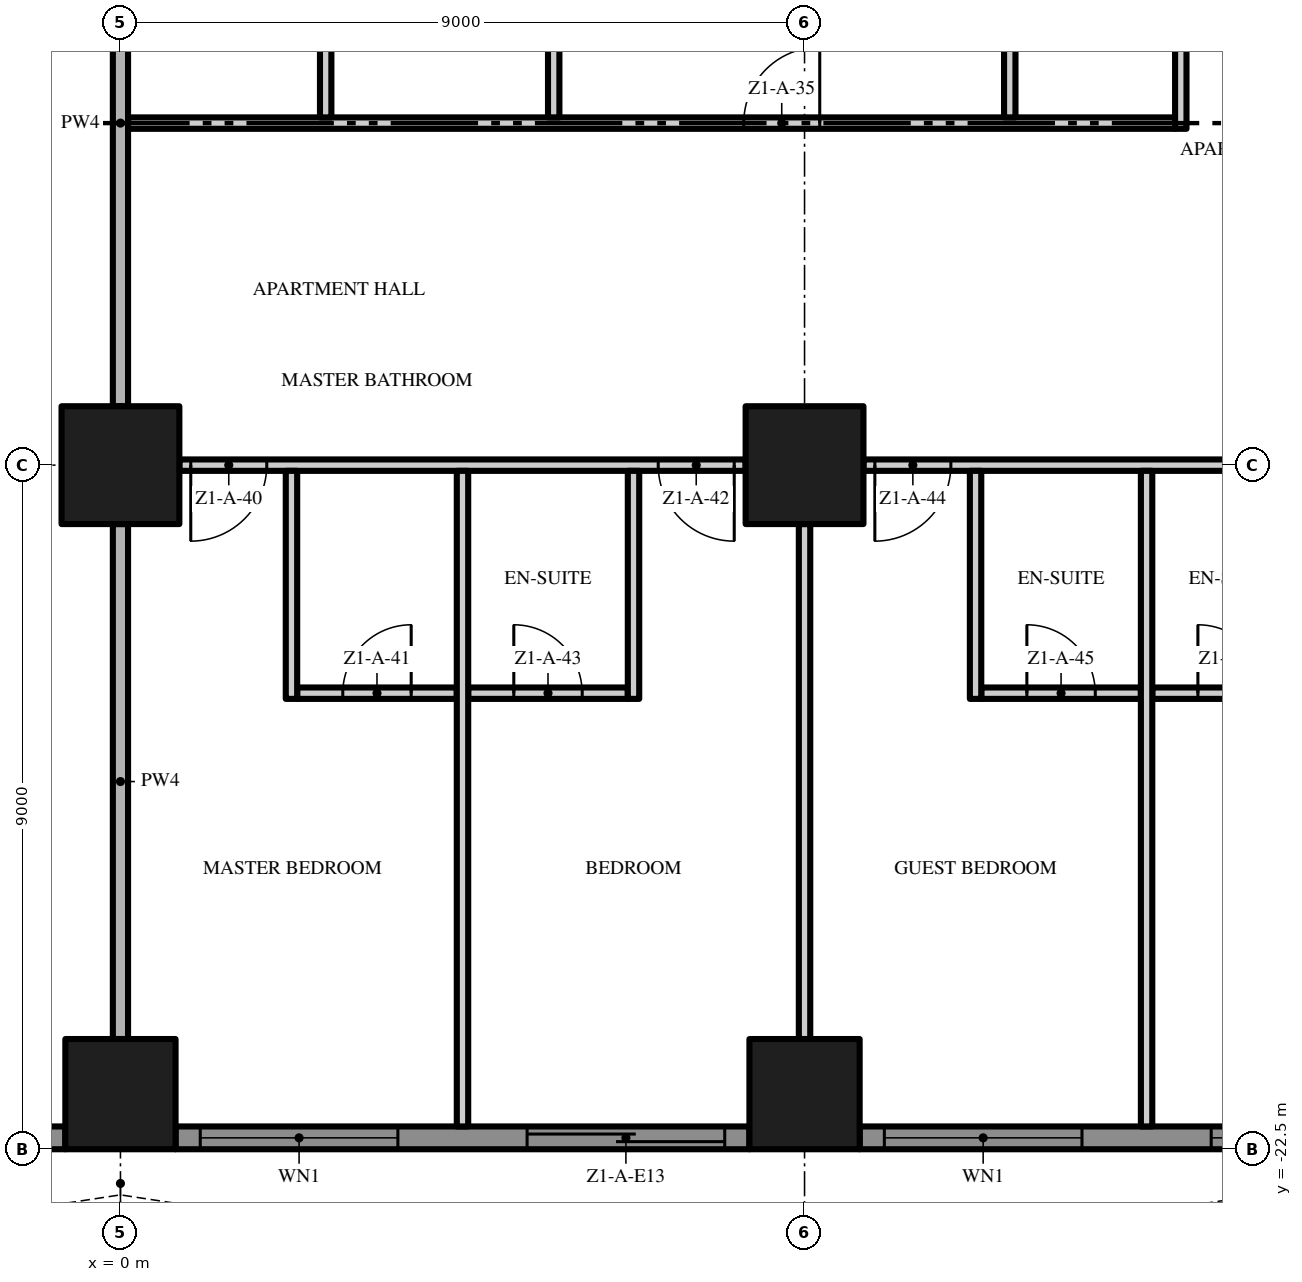
"""IFC4 building model, lengths in metres.
Left out: names, types, materials, properties, quantities, classifications, styles, units other than length and angle.
Written with IfcOpenShell. Run it as: python <this file> out.ifc"""

import sys

from ifc_helpers import new_model, si_unit, direction, frame, frame_2d, origin, origin_2d, place, context, subcontext, project, spatial, polyline, rectangle, outline, extrude, element, fill, save


model = new_model("IFC4")
c1 = context("Model", 3, precision=1e-05, world=origin(), true_north=direction((0.0, 1.0)))
c2 = subcontext(c1, "Body", "Model", "MODEL_VIEW")
j1 = project(units=[si_unit("LENGTHUNIT", "METRE"), si_unit("PLANEANGLEUNIT", "RADIAN")], contexts=[c1])
p1 = place(None, origin())
s1 = spatial("IfcSite", under=j1, at=p1, CompositionType="ELEMENT")
p2 = place(p1, origin())
s2 = spatial("IfcBuilding", under=s1, at=p2, CompositionType="ELEMENT")
p3 = place(p2, frame((0.0, 0.0, 22.6)))
s3 = spatial("IfcBuildingStorey", under=s2, at=p3, CompositionType="ELEMENT", Elevation=22.6)
p4 = place(p3, frame((0.0, -13.5, 0.0), z_axis=(0.0, 0.0, 1.0), x_axis=(1.0, 0.0, 0.0)))
e1 = element("IfcColumn", 1, at=p4, inside=s3, PredefinedType="COLUMN", context=c2, shape_type="SweptSolid", body=[
    extrude(rectangle(XDim=1.55, YDim=1.55, at=origin_2d()), origin(), (0.0, 0.0, 1.0), 3.5),
])
p5 = place(p3, frame((0.0, -21.775, 0.0), z_axis=(0.0, 0.0, 1.0), x_axis=(1.0, 0.0, 0.0)))
e2 = element("IfcColumn", 2, at=p5, inside=s3, PredefinedType="COLUMN", context=c2, shape_type="SweptSolid", body=[
    extrude(rectangle(XDim=1.45, YDim=1.45, at=origin_2d()), origin(), (0.0, 0.0, 1.0), 3.5),
])
p6 = place(p3, frame((9.0, -13.5, 0.0), z_axis=(0.0, 0.0, 1.0), x_axis=(1.0, 0.0, 0.0)))
e3 = element("IfcColumn", 3, at=p6, inside=s3, PredefinedType="COLUMN", context=c2, shape_type="SweptSolid", body=[
    extrude(rectangle(XDim=1.55, YDim=1.55, at=origin_2d()), origin(), (0.0, 0.0, 1.0), 3.5),
])
p7 = place(p3, frame((9.0, -21.775, 0.0), z_axis=(0.0, 0.0, 1.0), x_axis=(1.0, 0.0, 0.0)))
e4 = element("IfcColumn", 4, at=p7, inside=s3, PredefinedType="COLUMN", context=c2, shape_type="SweptSolid", body=[
    extrude(rectangle(XDim=1.45, YDim=1.45, at=origin_2d()), origin(), (0.0, 0.0, 1.0), 3.5),
])
p8 = place(p3, frame((-0.725, -22.35, 0.0), z_axis=(0.0, 0.0, 1.0), x_axis=(-1.0, 0.0, 0.0)))
e5 = element("IfcWall", 5, at=p8, inside=s3, PredefinedType="SOLIDWALL", context=c2, shape_type="SweptSolid", body=[
    extrude(rectangle(XDim=7.55, YDim=0.3, at=frame_2d((3.775, 0.0))), origin(), (0.0, 0.0, 1.0), 3.5),
])
p9 = place(p8, frame((4.625, 0.0, 0.0)))
e6 = element("IfcOpeningElement", 6, at=p9, cuts=e5, PredefinedType="OPENING", context=c2, shape_type="SweptSolid", body=[
    extrude(rectangle(XDim=2.6, YDim=2.4, at=frame_2d((1.3, 1.2))), frame((0.0, 0.16, 0.0), z_axis=(0.0, -1.0, 0.0), x_axis=(1.0, 0.0, 0.0)), (0.0, 0.0, 1.0), 0.32),
])
p10 = place(p8, frame((0.325, 0.0, 0.45)))
e7 = element("IfcOpeningElement", 7, at=p10, cuts=e5, PredefinedType="OPENING", context=c2, shape_type="SweptSolid", body=[
    extrude(rectangle(XDim=2.6, YDim=2.65, at=frame_2d((1.3, 1.325))), frame((0.0, 0.16, 0.0), z_axis=(0.0, -1.0, 0.0), x_axis=(1.0, 0.0, 0.0)), (0.0, 0.0, 1.0), 0.32),
])
p11 = place(p3, frame((8.275, -22.35, 0.0), z_axis=(0.0, 0.0, 1.0), x_axis=(-1.0, 0.0, 0.0)))
e8 = element("IfcWall", 8, at=p11, inside=s3, PredefinedType="SOLIDWALL", context=c2, shape_type="SweptSolid", body=[
    extrude(rectangle(XDim=7.55, YDim=0.3, at=frame_2d((3.775, 0.0))), origin(), (0.0, 0.0, 1.0), 3.5),
])
p12 = place(p11, frame((4.625, 0.0, 0.45)))
e9 = element("IfcOpeningElement", 9, at=p12, cuts=e8, PredefinedType="OPENING", context=c2, shape_type="SweptSolid", body=[
    extrude(rectangle(XDim=2.6, YDim=2.65, at=frame_2d((1.3, 1.325))), frame((0.0, 0.16, 0.0), z_axis=(0.0, -1.0, 0.0), x_axis=(1.0, 0.0, 0.0)), (0.0, 0.0, 1.0), 0.32),
])
p13 = place(p11, frame((0.325, 0.0, 0.0)))
e10 = element("IfcOpeningElement", 10, at=p13, cuts=e8, PredefinedType="OPENING", context=c2, shape_type="SweptSolid", body=[
    extrude(rectangle(XDim=2.6, YDim=2.4, at=frame_2d((1.3, 1.2))), frame((0.0, 0.16, 0.0), z_axis=(0.0, -1.0, 0.0), x_axis=(1.0, 0.0, 0.0)), (0.0, 0.0, 1.0), 0.32),
])
p14 = place(p3, frame((17.275, -22.35, 0.0), z_axis=(0.0, 0.0, 1.0), x_axis=(-1.0, 0.0, 0.0)))
e11 = element("IfcWall", 11, at=p14, inside=s3, PredefinedType="SOLIDWALL", context=c2, shape_type="SweptSolid", body=[
    extrude(rectangle(XDim=7.55, YDim=0.3, at=frame_2d((3.775, 0.0))), origin(), (0.0, 0.0, 1.0), 3.5),
])
p15 = place(p14, frame((4.625, 0.0, 0.45)))
e12 = element("IfcOpeningElement", 12, at=p15, cuts=e11, PredefinedType="OPENING", context=c2, shape_type="SweptSolid", body=[
    extrude(rectangle(XDim=2.6, YDim=2.65, at=frame_2d((1.3, 1.325))), frame((0.0, 0.16, 0.0), z_axis=(0.0, -1.0, 0.0), x_axis=(1.0, 0.0, 0.0)), (0.0, 0.0, 1.0), 0.32),
])
p16 = place(p14, frame((0.325, 0.0, 0.45)))
e13 = element("IfcOpeningElement", 13, at=p16, cuts=e11, PredefinedType="OPENING", context=c2, shape_type="SweptSolid", body=[
    extrude(rectangle(XDim=2.6, YDim=2.65, at=frame_2d((1.3, 1.325))), frame((0.0, 0.16, 0.0), z_axis=(0.0, -1.0, 0.0), x_axis=(1.0, 0.0, 0.0)), (0.0, 0.0, 1.0), 0.32),
])
p17 = place(p3, origin())
e14 = element("IfcWall", 14, at=p17, inside=s3, PredefinedType="USERDEFINED", context=c2, shape_type="SweptSolid", body=[
    extrude(outline(polyline([(-22.5, -25.5), (-21.0, -25.271), (-19.5, -24.671), (-18.0, -23.929), (-16.5, -23.329), (-15.0, -23.1), (-13.5, -23.329), (-12.0, -23.929), (-10.5, -24.671), (-9.0, -25.271), (-7.5, -25.5), (-6.0, -25.271), (-4.5, -24.671), (-3.0, -23.929), (-1.5, -23.329), (0.0, -23.1), (1.5, -23.329), (3.0, -23.929), (4.5, -24.671), (6.0, -25.271), (7.5, -25.5), (9.0, -25.271), (10.5, -24.671), (12.0, -23.929), (13.5, -23.329), (15.0, -23.1), (16.5, -23.329), (18.0, -23.929), (19.5, -24.671), (21.0, -25.271), (22.5, -25.5), (22.538, -25.253), (21.066, -25.028), (19.602, -24.442), (18.102, -23.701), (16.566, -23.086), (15.0, -22.847), (13.434, -23.086), (11.898, -23.701), (10.398, -24.442), (8.934, -25.028), (7.5, -25.247), (6.066, -25.028), (4.602, -24.442), (3.102, -23.701), (1.566, -23.086), (0.0, -22.847), (-1.566, -23.086), (-3.102, -23.701), (-4.602, -24.442), (-6.066, -25.028), (-7.5, -25.247), (-8.934, -25.028), (-10.398, -24.442), (-11.898, -23.701), (-13.434, -23.086), (-15.0, -22.847), (-16.566, -23.086), (-18.102, -23.701), (-19.602, -24.442), (-21.066, -25.028), (-22.538, -25.253), (-22.5, -25.5)])), origin(), (0.0, 0.0, 1.0), 0.9),
])
p18 = place(p3, frame((2.325, -16.5, 0.0), z_axis=(0.0, 0.0, 1.0), x_axis=(1.0, 0.0, 0.0)))
e15 = element("IfcWall", 15, at=p18, inside=s3, PredefinedType="PARTITIONING", context=c2, shape_type="SweptSolid", body=[
    extrude(rectangle(XDim=2.1, YDim=0.15, at=frame_2d((1.05, 0.0))), origin(), (0.0, 0.0, 1.0), 3.5),
])
p19 = place(p18, frame((0.6, 0.0, 0.0)))
e16 = element("IfcOpeningElement", 16, at=p19, cuts=e15, PredefinedType="OPENING", context=c2, shape_type="SweptSolid", body=[
    extrude(rectangle(XDim=0.9, YDim=2.1, at=frame_2d((0.45, 1.05))), frame((0.0, 0.085, 0.0), z_axis=(0.0, -1.0, 0.0), x_axis=(1.0, 0.0, 0.0)), (0.0, 0.0, 1.0), 0.17),
])
p20 = place(p3, frame((4.575, -16.5, 0.0), z_axis=(0.0, 0.0, 1.0), x_axis=(1.0, 0.0, 0.0)))
e17 = element("IfcWall", 17, at=p20, inside=s3, PredefinedType="PARTITIONING", context=c2, shape_type="SweptSolid", body=[
    extrude(rectangle(XDim=2.1, YDim=0.15, at=frame_2d((1.05, 0.0))), origin(), (0.0, 0.0, 1.0), 3.5),
])
p21 = place(p20, frame((0.6, 0.0, 0.0)))
e18 = element("IfcOpeningElement", 18, at=p21, cuts=e17, PredefinedType="OPENING", context=c2, shape_type="SweptSolid", body=[
    extrude(rectangle(XDim=0.9, YDim=2.1, at=frame_2d((0.45, 1.05))), frame((0.0, 0.085, 0.0), z_axis=(0.0, -1.0, 0.0), x_axis=(1.0, 0.0, 0.0)), (0.0, 0.0, 1.0), 0.17),
])
p22 = place(p3, frame((11.325, -16.5, 0.0), z_axis=(0.0, 0.0, 1.0), x_axis=(1.0, 0.0, 0.0)))
e19 = element("IfcWall", 19, at=p22, inside=s3, PredefinedType="PARTITIONING", context=c2, shape_type="SweptSolid", body=[
    extrude(rectangle(XDim=2.1, YDim=0.15, at=frame_2d((1.05, 0.0))), origin(), (0.0, 0.0, 1.0), 3.5),
])
p23 = place(p22, frame((0.6, 0.0, 0.0)))
e20 = element("IfcOpeningElement", 20, at=p23, cuts=e19, PredefinedType="OPENING", context=c2, shape_type="SweptSolid", body=[
    extrude(rectangle(XDim=0.9, YDim=2.1, at=frame_2d((0.45, 1.05))), frame((0.0, 0.085, 0.0), z_axis=(0.0, -1.0, 0.0), x_axis=(1.0, 0.0, 0.0)), (0.0, 0.0, 1.0), 0.17),
])
p24 = place(p3, frame((13.575, -16.5, 0.0), z_axis=(0.0, 0.0, 1.0), x_axis=(1.0, 0.0, 0.0)))
e21 = element("IfcWall", 21, at=p24, inside=s3, PredefinedType="PARTITIONING", context=c2, shape_type="SweptSolid", body=[
    extrude(rectangle(XDim=2.1, YDim=0.15, at=frame_2d((1.05, 0.0))), origin(), (0.0, 0.0, 1.0), 3.5),
])
p25 = place(p24, frame((0.6, 0.0, 0.0)))
e22 = element("IfcOpeningElement", 22, at=p25, cuts=e21, PredefinedType="OPENING", context=c2, shape_type="SweptSolid", body=[
    extrude(rectangle(XDim=0.9, YDim=2.1, at=frame_2d((0.45, 1.05))), frame((0.0, 0.085, 0.0), z_axis=(0.0, -1.0, 0.0), x_axis=(1.0, 0.0, 0.0)), (0.0, 0.0, 1.0), 0.17),
])
p26 = place(p3, frame((8.225, -13.5, 0.0), z_axis=(0.0, 0.0, 1.0), x_axis=(-1.0, 0.0, 0.0)))
e23 = element("IfcWall", 23, at=p26, inside=s3, PredefinedType="PARTITIONING", context=c2, shape_type="SweptSolid", body=[
    extrude(rectangle(XDim=7.45, YDim=0.15, at=frame_2d((3.725, 0.0))), origin(), (0.0, 0.0, 1.0), 3.5),
])
p27 = place(p26, frame((6.3, 0.0, 0.0)))
e24 = element("IfcOpeningElement", 24, at=p27, cuts=e23, PredefinedType="OPENING", context=c2, shape_type="SweptSolid", body=[
    extrude(rectangle(XDim=1.0, YDim=2.4, at=frame_2d((0.5, 1.2))), frame((0.0, 0.085, 0.0), z_axis=(0.0, -1.0, 0.0), x_axis=(1.0, 0.0, 0.0)), (0.0, 0.0, 1.0), 0.17),
])
p28 = place(p26, frame((0.15, 0.0, 0.0)))
e25 = element("IfcOpeningElement", 25, at=p28, cuts=e23, PredefinedType="OPENING", context=c2, shape_type="SweptSolid", body=[
    extrude(rectangle(XDim=1.0, YDim=2.4, at=frame_2d((0.5, 1.2))), frame((0.0, 0.085, 0.0), z_axis=(0.0, -1.0, 0.0), x_axis=(1.0, 0.0, 0.0)), (0.0, 0.0, 1.0), 0.17),
])
p29 = place(p3, frame((17.225, -13.5, 0.0), z_axis=(0.0, 0.0, 1.0), x_axis=(-1.0, 0.0, 0.0)))
e26 = element("IfcWall", 26, at=p29, inside=s3, PredefinedType="PARTITIONING", context=c2, shape_type="SweptSolid", body=[
    extrude(rectangle(XDim=7.45, YDim=0.15, at=frame_2d((3.725, 0.0))), origin(), (0.0, 0.0, 1.0), 3.5),
])
p30 = place(p29, frame((6.3, 0.0, 0.0)))
e27 = element("IfcOpeningElement", 27, at=p30, cuts=e26, PredefinedType="OPENING", context=c2, shape_type="SweptSolid", body=[
    extrude(rectangle(XDim=1.0, YDim=2.4, at=frame_2d((0.5, 1.2))), frame((0.0, 0.085, 0.0), z_axis=(0.0, -1.0, 0.0), x_axis=(1.0, 0.0, 0.0)), (0.0, 0.0, 1.0), 0.17),
])
p31 = place(p29, frame((0.15, 0.0, 0.0)))
e28 = element("IfcOpeningElement", 28, at=p31, cuts=e26, PredefinedType="OPENING", context=c2, shape_type="SweptSolid", body=[
    extrude(rectangle(XDim=1.0, YDim=2.4, at=frame_2d((0.5, 1.2))), frame((0.0, 0.085, 0.0), z_axis=(0.0, -1.0, 0.0), x_axis=(1.0, 0.0, 0.0)), (0.0, 0.0, 1.0), 0.17),
])
p32 = place(p3, frame((0.1, -9.0, 0.0), z_axis=(0.0, 0.0, 1.0), x_axis=(1.0, 0.0, 0.0)))
e29 = element("IfcWall", 29, at=p32, inside=s3, PredefinedType="PARTITIONING", context=c2, shape_type="SweptSolid", body=[
    extrude(rectangle(XDim=13.775, YDim=0.15, at=frame_2d((6.888, 0.0))), origin(), (0.0, 0.0, 1.0), 3.5),
])
p33 = place(p32, frame((8.1, 0.0, 0.0)))
e30 = element("IfcOpeningElement", 30, at=p33, cuts=e29, PredefinedType="OPENING", context=c2, shape_type="SweptSolid", body=[
    extrude(rectangle(XDim=1.0, YDim=2.4, at=frame_2d((0.5, 1.2))), frame((0.0, 0.085, 0.0), z_axis=(0.0, -1.0, 0.0), x_axis=(1.0, 0.0, 0.0)), (0.0, 0.0, 1.0), 0.17),
])
p34 = place(p3, frame((0.0, -21.05, 0.0), z_axis=(0.0, 0.0, 1.0), x_axis=(0.0, 1.0, 0.0)))
e31 = element("IfcWall", 31, at=p34, inside=s3, PredefinedType="PARTITIONING", context=c2, shape_type="SweptSolid", body=[
    extrude(rectangle(XDim=6.775, YDim=0.2, at=frame_2d((3.388, 0.0))), origin(), (0.0, 0.0, 1.0), 3.5),
])
p35 = place(p3, frame((0.0, -12.725, 0.0), z_axis=(0.0, 0.0, 1.0), x_axis=(0.0, 1.0, 0.0)))
e32 = element("IfcWall", 32, at=p35, inside=s3, PredefinedType="PARTITIONING", context=c2, shape_type="SweptSolid", body=[
    extrude(rectangle(XDim=7.45, YDim=0.2, at=frame_2d((3.725, 0.0))), origin(), (0.0, 0.0, 1.0), 3.5),
])
p36 = place(p3, frame((2.25, -16.575, 0.0), z_axis=(0.0, 0.0, 1.0), x_axis=(0.0, 1.0, 0.0)))
e33 = element("IfcWall", 33, at=p36, inside=s3, PredefinedType="PARTITIONING", context=c2, shape_type="SweptSolid", body=[
    extrude(rectangle(XDim=3.0, YDim=0.15, at=frame_2d((1.5, 0.0))), origin(), (0.0, 0.0, 1.0), 3.5),
])
p37 = place(p3, frame((2.7, -8.925, 0.0), z_axis=(0.0, 0.0, 1.0), x_axis=(0.0, 1.0, 0.0)))
e34 = element("IfcWall", 34, at=p37, inside=s3, PredefinedType="PARTITIONING", context=c2, shape_type="SweptSolid", body=[
    extrude(rectangle(XDim=4.35, YDim=0.15, at=frame_2d((2.175, 0.0))), origin(), (0.0, 0.0, 1.0), 3.5),
])
p38 = place(p3, frame((4.5, -22.2, 0.0), z_axis=(0.0, 0.0, 1.0), x_axis=(0.0, 1.0, 0.0)))
e35 = element("IfcWall", 35, at=p38, inside=s3, PredefinedType="PARTITIONING", context=c2, shape_type="SweptSolid", body=[
    extrude(rectangle(XDim=8.625, YDim=0.15, at=frame_2d((4.312, 0.0))), origin(), (0.0, 0.0, 1.0), 3.5),
])
p39 = place(p3, frame((5.7, -8.925, 0.0), z_axis=(0.0, 0.0, 1.0), x_axis=(0.0, 1.0, 0.0)))
e36 = element("IfcWall", 36, at=p39, inside=s3, PredefinedType="PARTITIONING", context=c2, shape_type="SweptSolid", body=[
    extrude(rectangle(XDim=4.35, YDim=0.15, at=frame_2d((2.175, 0.0))), origin(), (0.0, 0.0, 1.0), 3.5),
])
p40 = place(p3, frame((6.75, -16.575, 0.0), z_axis=(0.0, 0.0, 1.0), x_axis=(0.0, 1.0, 0.0)))
e37 = element("IfcWall", 37, at=p40, inside=s3, PredefinedType="PARTITIONING", context=c2, shape_type="SweptSolid", body=[
    extrude(rectangle(XDim=3.0, YDim=0.15, at=frame_2d((1.5, 0.0))), origin(), (0.0, 0.0, 1.0), 3.5),
])
p41 = place(p3, frame((9.0, -21.05, 0.0), z_axis=(0.0, 0.0, 1.0), x_axis=(0.0, 1.0, 0.0)))
e38 = element("IfcWall", 38, at=p41, inside=s3, PredefinedType="PARTITIONING", context=c2, shape_type="SweptSolid", body=[
    extrude(rectangle(XDim=6.775, YDim=0.15, at=frame_2d((3.388, 0.0))), origin(), (0.0, 0.0, 1.0), 3.5),
])
p42 = place(p3, frame((11.25, -16.575, 0.0), z_axis=(0.0, 0.0, 1.0), x_axis=(0.0, 1.0, 0.0)))
e39 = element("IfcWall", 39, at=p42, inside=s3, PredefinedType="PARTITIONING", context=c2, shape_type="SweptSolid", body=[
    extrude(rectangle(XDim=3.0, YDim=0.15, at=frame_2d((1.5, 0.0))), origin(), (0.0, 0.0, 1.0), 3.5),
])
p43 = place(p3, frame((11.7, -8.925, 0.0), z_axis=(0.0, 0.0, 1.0), x_axis=(0.0, 1.0, 0.0)))
e40 = element("IfcWall", 40, at=p43, inside=s3, PredefinedType="PARTITIONING", context=c2, shape_type="SweptSolid", body=[
    extrude(rectangle(XDim=4.35, YDim=0.15, at=frame_2d((2.175, 0.0))), origin(), (0.0, 0.0, 1.0), 3.5),
])
p44 = place(p3, frame((13.5, -22.2, 0.0), z_axis=(0.0, 0.0, 1.0), x_axis=(0.0, 1.0, 0.0)))
e41 = element("IfcWall", 41, at=p44, inside=s3, PredefinedType="PARTITIONING", context=c2, shape_type="SweptSolid", body=[
    extrude(rectangle(XDim=8.625, YDim=0.15, at=frame_2d((4.312, 0.0))), origin(), (0.0, 0.0, 1.0), 3.5),
])
p45 = place(p3, frame((13.95, -9.075, 0.0), z_axis=(0.0, 0.0, 1.0), x_axis=(0.0, 1.0, 0.0)))
e42 = element("IfcWall", 42, at=p45, inside=s3, PredefinedType="PARTITIONING", context=c2, shape_type="SweptSolid", body=[
    extrude(rectangle(XDim=4.65, YDim=0.15, at=frame_2d((2.325, 0.0))), origin(), (0.0, 0.0, 1.0), 3.5),
])
p46 = place(p45, frame((1.875, 0.0, 0.0)))
e43 = element("IfcOpeningElement", 43, at=p46, cuts=e42, PredefinedType="OPENING", context=c2, shape_type="SweptSolid", body=[
    extrude(rectangle(XDim=0.9, YDim=2.1, at=frame_2d((0.45, 1.05))), frame((0.0, 0.085, 0.0), z_axis=(0.0, -1.0, 0.0), x_axis=(1.0, 0.0, 0.0)), (0.0, 0.0, 1.0), 0.17),
])
p47 = place(p12, origin())
e44 = element("IfcWindow", 44, at=p47, inside=s3, PartitioningType="SINGLE_PANEL", PredefinedType="WINDOW", context=c2, shape_type="SweptSolid", body=[
    extrude(rectangle(XDim=2.6, YDim=2.65, at=frame_2d((1.3, 1.325))), frame((0.0, 0.03, 0.0), z_axis=(0.0, -1.0, 0.0), x_axis=(1.0, 0.0, 0.0)), (0.0, 0.0, 1.0), 0.06),
])
fill(e9, e44)
p48 = place(p13, origin())
e45 = element("IfcDoor", 45, at=p48, inside=s3, OperationType="SINGLE_SWING_LEFT", PredefinedType="DOOR", context=c2, shape_type="SweptSolid", body=[
    extrude(rectangle(XDim=2.6, YDim=2.4, at=frame_2d((1.3, 1.2))), frame((0.0, 0.025, 0.0), z_axis=(0.0, -1.0, 0.0), x_axis=(1.0, 0.0, 0.0)), (0.0, 0.0, 1.0), 0.05),
])
fill(e10, e45)
p49 = place(p15, origin())
e46 = element("IfcWindow", 46, at=p49, inside=s3, PartitioningType="SINGLE_PANEL", PredefinedType="WINDOW", context=c2, shape_type="SweptSolid", body=[
    extrude(rectangle(XDim=2.6, YDim=2.65, at=frame_2d((1.3, 1.325))), frame((0.0, 0.03, 0.0), z_axis=(0.0, -1.0, 0.0), x_axis=(1.0, 0.0, 0.0)), (0.0, 0.0, 1.0), 0.06),
])
fill(e12, e46)
p50 = place(p16, origin())
e47 = element("IfcWindow", 47, at=p50, inside=s3, PartitioningType="SINGLE_PANEL", PredefinedType="WINDOW", context=c2, shape_type="SweptSolid", body=[
    extrude(rectangle(XDim=2.6, YDim=2.65, at=frame_2d((1.3, 1.325))), frame((0.0, 0.03, 0.0), z_axis=(0.0, -1.0, 0.0), x_axis=(1.0, 0.0, 0.0)), (0.0, 0.0, 1.0), 0.06),
])
fill(e13, e47)
p51 = place(p33, origin())
e48 = element("IfcDoor", 48, at=p51, inside=s3, OperationType="SINGLE_SWING_RIGHT", PredefinedType="DOOR", context=c2, shape_type="SweptSolid", body=[
    extrude(rectangle(XDim=1.0, YDim=2.4, at=frame_2d((0.5, 1.2))), frame((0.0, 0.025, 0.0), z_axis=(0.0, -1.0, 0.0), x_axis=(1.0, 0.0, 0.0)), (0.0, 0.0, 1.0), 0.05),
])
fill(e30, e48)
p52 = place(p27, origin())
e49 = element("IfcDoor", 49, at=p52, inside=s3, OperationType="SINGLE_SWING_RIGHT", PredefinedType="DOOR", context=c2, shape_type="SweptSolid", body=[
    extrude(rectangle(XDim=1.0, YDim=2.4, at=frame_2d((0.5, 1.2))), frame((0.0, 0.025, 0.0), z_axis=(0.0, -1.0, 0.0), x_axis=(1.0, 0.0, 0.0)), (0.0, 0.0, 1.0), 0.05),
])
fill(e24, e49)
p53 = place(p19, origin())
e50 = element("IfcDoor", 50, at=p53, inside=s3, OperationType="SINGLE_SWING_RIGHT", PredefinedType="DOOR", context=c2, shape_type="SweptSolid", body=[
    extrude(rectangle(XDim=0.9, YDim=2.1, at=frame_2d((0.45, 1.05))), frame((0.0, 0.025, 0.0), z_axis=(0.0, -1.0, 0.0), x_axis=(1.0, 0.0, 0.0)), (0.0, 0.0, 1.0), 0.05),
])
fill(e16, e50)
p54 = place(p28, origin())
e51 = element("IfcDoor", 51, at=p54, inside=s3, OperationType="SINGLE_SWING_LEFT", PredefinedType="DOOR", context=c2, shape_type="SweptSolid", body=[
    extrude(rectangle(XDim=1.0, YDim=2.4, at=frame_2d((0.5, 1.2))), frame((0.0, 0.025, 0.0), z_axis=(0.0, -1.0, 0.0), x_axis=(1.0, 0.0, 0.0)), (0.0, 0.0, 1.0), 0.05),
])
fill(e25, e51)
p55 = place(p21, origin())
e52 = element("IfcDoor", 52, at=p55, inside=s3, OperationType="SINGLE_SWING_LEFT", PredefinedType="DOOR", context=c2, shape_type="SweptSolid", body=[
    extrude(rectangle(XDim=0.9, YDim=2.1, at=frame_2d((0.45, 1.05))), frame((0.0, 0.025, 0.0), z_axis=(0.0, -1.0, 0.0), x_axis=(1.0, 0.0, 0.0)), (0.0, 0.0, 1.0), 0.05),
])
fill(e18, e52)
p56 = place(p30, origin())
e53 = element("IfcDoor", 53, at=p56, inside=s3, OperationType="SINGLE_SWING_RIGHT", PredefinedType="DOOR", context=c2, shape_type="SweptSolid", body=[
    extrude(rectangle(XDim=1.0, YDim=2.4, at=frame_2d((0.5, 1.2))), frame((0.0, 0.025, 0.0), z_axis=(0.0, -1.0, 0.0), x_axis=(1.0, 0.0, 0.0)), (0.0, 0.0, 1.0), 0.05),
])
fill(e27, e53)
p57 = place(p23, origin())
e54 = element("IfcDoor", 54, at=p57, inside=s3, OperationType="SINGLE_SWING_LEFT", PredefinedType="DOOR", context=c2, shape_type="SweptSolid", body=[
    extrude(rectangle(XDim=0.9, YDim=2.1, at=frame_2d((0.45, 1.05))), frame((0.0, 0.025, 0.0), z_axis=(0.0, -1.0, 0.0), x_axis=(1.0, 0.0, 0.0)), (0.0, 0.0, 1.0), 0.05),
])
fill(e20, e54)
p58 = place(p25, origin())
e55 = element("IfcDoor", 55, at=p58, inside=s3, OperationType="SINGLE_SWING_LEFT", PredefinedType="DOOR", context=c2, shape_type="SweptSolid", body=[
    extrude(rectangle(XDim=0.9, YDim=2.1, at=frame_2d((0.45, 1.05))), frame((0.0, 0.025, 0.0), z_axis=(0.0, -1.0, 0.0), x_axis=(1.0, 0.0, 0.0)), (0.0, 0.0, 1.0), 0.05),
])
fill(e22, e55)
save(model, sys.argv[1])
